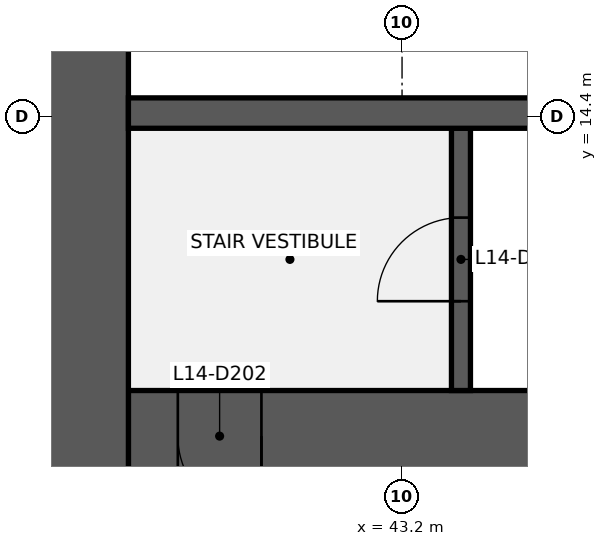
"""IFC4 building model, lengths in metres.
Left out: names, types, materials, properties, quantities, classifications, styles, units other than length and angle.
Written with IfcOpenShell. Run it as: python <this file> out.ifc"""

import sys

from ifc_helpers import new_model, si_unit, direction, frame, frame_2d, origin, place, context, subcontext, project, spatial, rectangle, extrude, element, fill, save


model = new_model("IFC4")
c1 = context("Model", 3, precision=1e-05, world=origin(), true_north=direction((0.0, 1.0)))
c2 = subcontext(c1, "Body", "Model", "MODEL_VIEW")
j1 = project(units=[si_unit("LENGTHUNIT", "METRE"), si_unit("PLANEANGLEUNIT", "RADIAN")], contexts=[c1])
p1 = place(None, origin())
s1 = spatial("IfcSite", under=j1, at=p1, CompositionType="ELEMENT")
p2 = place(p1, origin())
s2 = spatial("IfcBuilding", under=s1, at=p2, CompositionType="ELEMENT")
p3 = place(p2, frame((0.0, 0.0, 67.0)))
s3 = spatial("IfcBuildingStorey", under=s2, at=p3, CompositionType="ELEMENT", Elevation=67.0)
p4 = place(p3, frame((52.8, 10.2, 0.0), z_axis=(0.0, 0.0, 1.0), x_axis=(-1.0, 0.0, 0.0)))
e1 = element("IfcWall", 1, at=p4, inside=s3, PredefinedType="SHEAR", context=c2, shape_type="SweptSolid", body=[
    extrude(rectangle(XDim=13.2, YDim=1.2, at=frame_2d((6.6, 0.0))), origin(), (0.0, 0.0, 1.0), 3.84),
])
p5 = place(p4, frame((11.45, 0.0, 0.0)))
e2 = element("IfcOpeningElement", 2, at=p5, cuts=e1, PredefinedType="OPENING", context=c2, shape_type="SweptSolid", body=[
    extrude(rectangle(XDim=1.1, YDim=2.1, at=frame_2d((0.55, 1.05))), frame((0.0, 0.61, 0.0), z_axis=(0.0, -1.0, 0.0), x_axis=(1.0, 0.0, 0.0)), (0.0, 0.0, 1.0), 1.22),
])
p6 = place(p3, frame((39.0, 9.6, 0.0), z_axis=(0.0, 0.0, 1.0), x_axis=(0.0, 1.0, 0.0)))
e3 = element("IfcWall", 3, at=p6, inside=s3, PredefinedType="SHEAR", context=c2, shape_type="SweptSolid", body=[
    extrude(rectangle(XDim=28.8, YDim=1.2, at=frame_2d((14.4, 0.0))), origin(), (0.0, 0.0, 1.0), 3.84),
])
p7 = place(p6, frame((8.7, 0.0, 0.0)))
e4 = element("IfcOpeningElement", 4, at=p7, cuts=e3, PredefinedType="OPENING", context=c2, shape_type="SweptSolid", body=[
    extrude(rectangle(XDim=1.8, YDim=2.1, at=frame_2d((0.9, 1.05))), frame((0.0, 0.61, 0.0), z_axis=(0.0, -1.0, 0.0), x_axis=(1.0, 0.0, 0.0)), (0.0, 0.0, 1.0), 1.22),
])
p8 = place(p6, frame((18.3, 0.0, 0.0)))
e5 = element("IfcOpeningElement", 5, at=p8, cuts=e3, PredefinedType="OPENING", context=c2, shape_type="SweptSolid", body=[
    extrude(rectangle(XDim=1.8, YDim=2.1, at=frame_2d((0.9, 1.05))), frame((0.0, 0.61, 0.0), z_axis=(0.0, -1.0, 0.0), x_axis=(1.0, 0.0, 0.0)), (0.0, 0.0, 1.0), 1.22),
])
p9 = place(p3, frame((43.975, 10.8, 0.0), z_axis=(0.0, 0.0, 1.0), x_axis=(0.0, 1.0, 0.0)))
e6 = element("IfcWall", 6, at=p9, inside=s3, PredefinedType="SHEAR", context=c2, shape_type="SweptSolid", body=[
    extrude(rectangle(XDim=3.45, YDim=0.25, at=frame_2d((1.725, 0.0))), origin(), (0.0, 0.0, 1.0), 3.84),
])
p10 = place(p9, frame((1.175, 0.0, 0.0)))
e7 = element("IfcOpeningElement", 7, at=p10, cuts=e6, PredefinedType="OPENING", context=c2, shape_type="SweptSolid", body=[
    extrude(rectangle(XDim=1.1, YDim=2.1, at=frame_2d((0.55, 1.05))), frame((0.0, 0.135, 0.0), z_axis=(0.0, -1.0, 0.0), x_axis=(1.0, 0.0, 0.0)), (0.0, 0.0, 1.0), 0.27),
])
p11 = place(p3, frame((39.6, 14.45, 0.0), z_axis=(0.0, 0.0, 1.0), x_axis=(1.0, 0.0, 0.0)))
e8 = element("IfcWall", 8, at=p11, inside=s3, PredefinedType="SHEAR", context=c2, shape_type="SweptSolid", body=[
    extrude(rectangle(XDim=16.8, YDim=0.4, at=frame_2d((8.4, 0.0))), origin(), (0.0, 0.0, 1.0), 3.84),
])
p12 = place(p10, origin())
e9 = element("IfcDoor", 9, at=p12, inside=s3, OperationType="SINGLE_SWING_LEFT", PredefinedType="DOOR", context=c2, shape_type="SweptSolid", body=[
    extrude(rectangle(XDim=1.1, YDim=2.1, at=frame_2d((0.55, 1.05))), frame((0.0, 0.025, 0.0), z_axis=(0.0, -1.0, 0.0), x_axis=(1.0, 0.0, 0.0)), (0.0, 0.0, 1.0), 0.05),
])
fill(e7, e9)
p13 = place(p5, origin())
e10 = element("IfcDoor", 10, at=p13, inside=s3, OperationType="SINGLE_SWING_LEFT", PredefinedType="DOOR", context=c2, shape_type="SweptSolid", body=[
    extrude(rectangle(XDim=1.1, YDim=2.1, at=frame_2d((0.55, 1.05))), frame((0.0, 0.025, 0.0), z_axis=(0.0, -1.0, 0.0), x_axis=(1.0, 0.0, 0.0)), (0.0, 0.0, 1.0), 0.05),
])
fill(e2, e10)
save(model, sys.argv[1])
